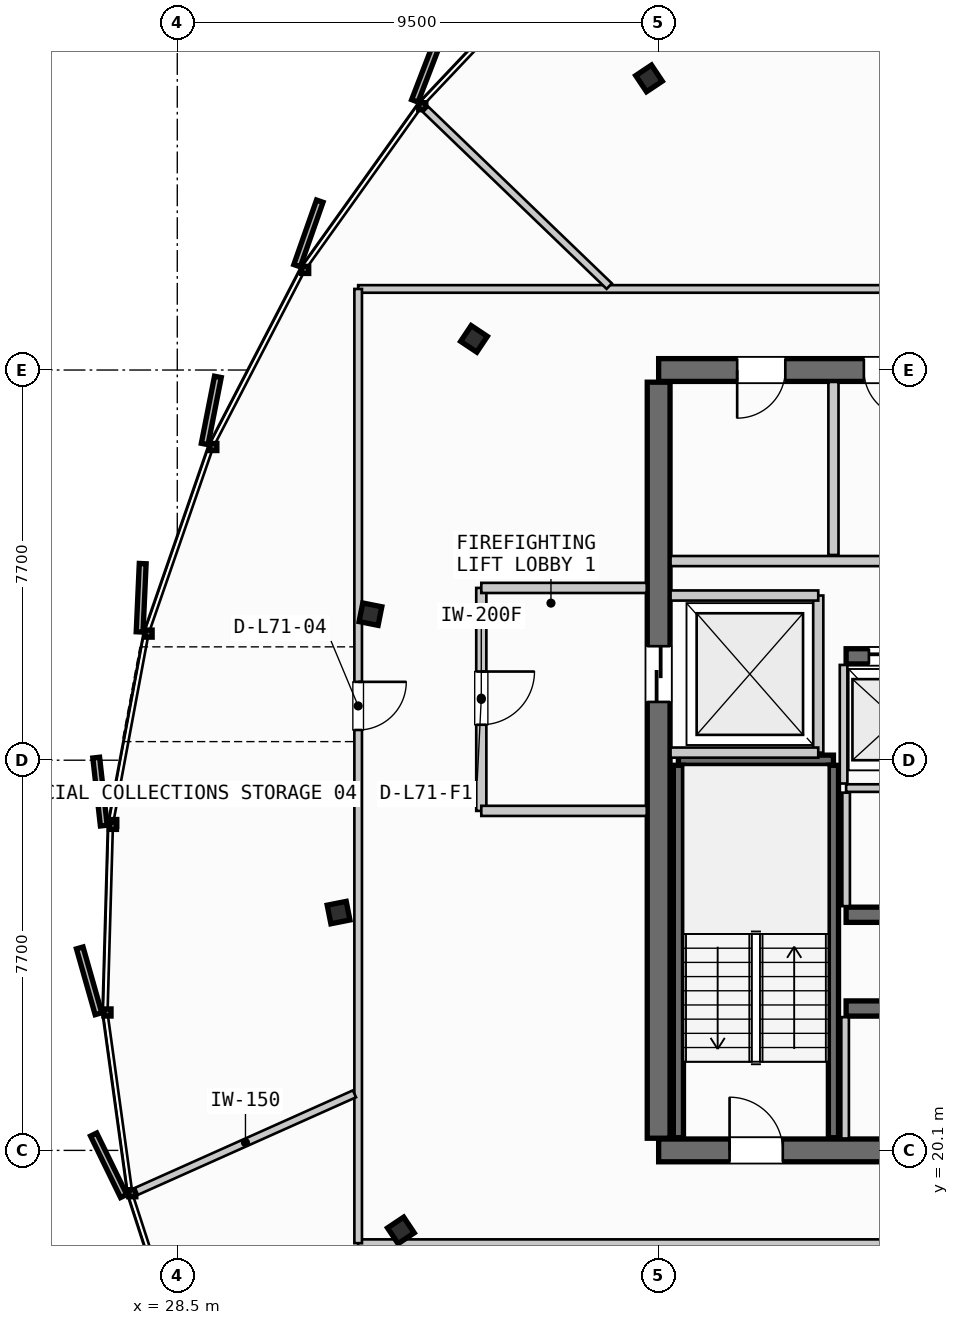
"""IFC4 building model, lengths in metres.
Left out: names, types, materials, properties, quantities, classifications, styles, units other than length and angle.
Written with IfcOpenShell. Run it as: python <this file> out.ifc"""

import sys

from ifc_helpers import new_model, si_unit, direction, frame, frame_2d, origin, origin_2d, place, context, subcontext, project, spatial, rectangle, i_section, extrude, source, transform, mapped, element, fill, save


model = new_model("IFC4")
c1 = context("Model", 3, precision=1e-05, world=origin(), true_north=direction((0.0, 1.0)))
c2 = subcontext(c1, "Body", "Model", "MODEL_VIEW")
j1 = project(units=[si_unit("LENGTHUNIT", "METRE"), si_unit("PLANEANGLEUNIT", "RADIAN")], contexts=[c1])
p1 = place(None, origin())
s1 = spatial("IfcSite", under=j1, at=p1, CompositionType="ELEMENT")
p2 = place(p1, origin())
s2 = spatial("IfcBuilding", under=s1, at=p2, CompositionType="ELEMENT")
p3 = place(p2, frame((0.0, 0.0, 269.8)))
s3 = spatial("IfcBuildingStorey", under=s2, at=p3, CompositionType="ELEMENT", Elevation=269.8)
p4 = place(p3, frame((38.0, 20.1, 0.0), z_axis=(0.0, 0.0, 1.0), x_axis=(1.0, 0.0, 0.0)))
e1 = element("IfcWall", 1, at=p4, inside=s3, PredefinedType="SHEAR", context=c2, shape_type="SweptSolid", body=[
    extrude(rectangle(XDim=17.6, YDim=0.45, at=frame_2d((8.8, 0.0))), origin(), (0.0, 0.0, 1.0), 3.21),
])
p5 = place(p4, frame((1.4, 0.0, 0.0)))
e2 = element("IfcOpeningElement", 2, at=p5, cuts=e1, PredefinedType="OPENING", context=c2, shape_type="SweptSolid", body=[
    extrude(rectangle(XDim=1.05, YDim=2.15, at=frame_2d((0.525, 1.075))), frame((0.0, 0.235, 0.0), z_axis=(0.0, -1.0, 0.0), x_axis=(1.0, 0.0, 0.0)), (0.0, 0.0, 1.0), 0.47),
])
p6 = place(p4, frame((15.15, 0.0, 0.0)))
e3 = element("IfcOpeningElement", 3, at=p6, cuts=e1, PredefinedType="OPENING", context=c2, shape_type="SweptSolid", body=[
    extrude(rectangle(XDim=1.05, YDim=2.15, at=frame_2d((0.525, 1.075))), frame((0.0, 0.235, 0.0), z_axis=(0.0, -1.0, 0.0), x_axis=(1.0, 0.0, 0.0)), (0.0, 0.0, 1.0), 0.47),
])
p7 = place(p4, frame((5.25, 0.0, 0.0)))
e4 = element("IfcOpeningElement", 4, at=p7, cuts=e1, PredefinedType="OPENING", context=c2, shape_type="SweptSolid", body=[
    extrude(rectangle(XDim=0.95, YDim=2.15, at=frame_2d((0.475, 1.075))), frame((0.0, 0.235, 0.0), z_axis=(0.0, -1.0, 0.0), x_axis=(1.0, 0.0, 0.0)), (0.0, 0.0, 1.0), 0.47),
])
p8 = place(p4, frame((11.4, 0.0, 0.0)))
e5 = element("IfcOpeningElement", 5, at=p8, cuts=e1, PredefinedType="OPENING", context=c2, shape_type="SweptSolid", body=[
    extrude(rectangle(XDim=0.95, YDim=2.15, at=frame_2d((0.475, 1.075))), frame((0.0, 0.235, 0.0), z_axis=(0.0, -1.0, 0.0), x_axis=(1.0, 0.0, 0.0)), (0.0, 0.0, 1.0), 0.47),
])
p9 = place(p3, frame((55.6, 35.5, 0.0), z_axis=(0.0, 0.0, 1.0), x_axis=(-1.0, 0.0, 0.0)))
e6 = element("IfcWall", 6, at=p9, inside=s3, PredefinedType="SHEAR", context=c2, shape_type="SweptSolid", body=[
    extrude(rectangle(XDim=17.6, YDim=0.45, at=frame_2d((8.8, 0.0))), origin(), (0.0, 0.0, 1.0), 3.21),
])
p10 = place(p9, frame((8.05, 0.0, 0.0)))
e7 = element("IfcOpeningElement", 7, at=p10, cuts=e6, PredefinedType="OPENING", context=c2, shape_type="SweptSolid", body=[
    extrude(rectangle(XDim=1.5, YDim=2.2, at=frame_2d((0.75, 1.1))), frame((0.0, 0.235, 0.0), z_axis=(0.0, -1.0, 0.0), x_axis=(1.0, 0.0, 0.0)), (0.0, 0.0, 1.0), 0.47),
])
p11 = place(p9, frame((15.1, 0.0, 0.0)))
e8 = element("IfcOpeningElement", 8, at=p11, cuts=e6, PredefinedType="OPENING", context=c2, shape_type="SweptSolid", body=[
    extrude(rectangle(XDim=0.95, YDim=2.15, at=frame_2d((0.475, 1.075))), frame((0.0, 0.235, 0.0), z_axis=(0.0, -1.0, 0.0), x_axis=(1.0, 0.0, 0.0)), (0.0, 0.0, 1.0), 0.47),
])
p12 = place(p9, frame((12.6, 0.0, 0.0)))
e9 = element("IfcOpeningElement", 9, at=p12, cuts=e6, PredefinedType="OPENING", context=c2, shape_type="SweptSolid", body=[
    extrude(rectangle(XDim=0.95, YDim=2.15, at=frame_2d((0.475, 1.075))), frame((0.0, 0.235, 0.0), z_axis=(0.0, -1.0, 0.0), x_axis=(1.0, 0.0, 0.0)), (0.0, 0.0, 1.0), 0.47),
])
p13 = place(p9, frame((10.45, 0.0, 0.0)))
e10 = element("IfcOpeningElement", 10, at=p13, cuts=e6, PredefinedType="OPENING", context=c2, shape_type="SweptSolid", body=[
    extrude(rectangle(XDim=0.95, YDim=2.15, at=frame_2d((0.475, 1.075))), frame((0.0, 0.235, 0.0), z_axis=(0.0, -1.0, 0.0), x_axis=(1.0, 0.0, 0.0)), (0.0, 0.0, 1.0), 0.47),
])
p14 = place(p3, frame((38.0, 35.26, 0.0), z_axis=(0.0, 0.0, 1.0), x_axis=(0.0, -1.0, 0.0)))
e11 = element("IfcWall", 11, at=p14, inside=s3, PredefinedType="SHEAR", context=c2, shape_type="SweptSolid", body=[
    extrude(rectangle(XDim=14.92, YDim=0.45, at=frame_2d((7.46, 0.0))), origin(), (0.0, 0.0, 1.0), 3.21),
])
p15 = place(p14, frame((5.21, 0.0, 0.0)))
e12 = element("IfcOpeningElement", 12, at=p15, cuts=e11, PredefinedType="OPENING", context=c2, shape_type="SweptSolid", body=[
    extrude(rectangle(XDim=1.1, YDim=2.2, at=frame_2d((0.55, 1.1))), frame((0.0, 0.235, 0.0), z_axis=(0.0, -1.0, 0.0), x_axis=(1.0, 0.0, 0.0)), (0.0, 0.0, 1.0), 0.47),
])
p16 = place(p3, frame((41.7, 22.9, 0.0), z_axis=(0.0, 0.0, 1.0), x_axis=(1.0, 0.0, 0.0)))
e13 = element("IfcWall", 13, at=p16, inside=s3, PredefinedType="SHEAR", context=c2, shape_type="SweptSolid", body=[
    extrude(rectangle(XDim=4.25, YDim=0.3, at=frame_2d((2.125, 0.0))), origin(), (0.0, 0.0, 1.0), 3.21),
])
p17 = place(p3, frame((41.7, 24.75, 0.0), z_axis=(0.0, 0.0, 1.0), x_axis=(1.0, 0.0, 0.0)))
e14 = element("IfcWall", 14, at=p17, inside=s3, PredefinedType="SHEAR", context=c2, shape_type="SweptSolid", body=[
    extrude(rectangle(XDim=4.25, YDim=0.3, at=frame_2d((2.125, 0.0))), origin(), (0.0, 0.0, 1.0), 3.21),
])
p18 = place(p17, frame((1.55, 0.0, 0.0)))
e15 = element("IfcOpeningElement", 15, at=p18, cuts=e14, PredefinedType="OPENING", context=c2, shape_type="SweptSolid", body=[
    extrude(rectangle(XDim=0.95, YDim=2.15, at=frame_2d((0.475, 1.075))), frame((0.0, 0.16, 0.0), z_axis=(0.0, -1.0, 0.0), x_axis=(1.0, 0.0, 0.0)), (0.0, 0.0, 1.0), 0.32),
])
p19 = place(p3, frame((41.7, 29.85, 0.0), z_axis=(0.0, 0.0, 1.0), x_axis=(1.0, 0.0, 0.0)))
e16 = element("IfcWall", 16, at=p19, inside=s3, PredefinedType="SHEAR", context=c2, shape_type="SweptSolid", body=[
    extrude(rectangle(XDim=4.25, YDim=0.3, at=frame_2d((2.125, 0.0))), origin(), (0.0, 0.0, 1.0), 3.21),
])
p20 = place(p19, frame((0.45, 0.0, 0.0)))
e17 = element("IfcOpeningElement", 17, at=p20, cuts=e16, PredefinedType="OPENING", context=c2, shape_type="SweptSolid", body=[
    extrude(rectangle(XDim=1.1, YDim=2.2, at=frame_2d((0.55, 1.1))), frame((0.0, 0.16, 0.0), z_axis=(0.0, -1.0, 0.0), x_axis=(1.0, 0.0, 0.0)), (0.0, 0.0, 1.0), 0.32),
])
p21 = place(p19, frame((2.5, 0.0, 0.0)))
e18 = element("IfcOpeningElement", 18, at=p21, cuts=e16, PredefinedType="OPENING", context=c2, shape_type="SweptSolid", body=[
    extrude(rectangle(XDim=1.1, YDim=2.2, at=frame_2d((0.55, 1.1))), frame((0.0, 0.16, 0.0), z_axis=(0.0, -1.0, 0.0), x_axis=(1.0, 0.0, 0.0)), (0.0, 0.0, 1.0), 0.32),
])
m1 = source(origin(), c2, "Body", "SweptSolid", [
    extrude(i_section(OverallWidth=0.374, OverallDepth=0.383, WebThickness=0.017, FlangeThickness=0.026, FilletRadius=0.015, at=origin_2d()), origin(), (0.0, 0.0, 1.0), 3.21),
])
for number, where, z_axis, x_axis in (
    (19, (37.81, 41.255, 0.0), (0.0, 0.0, 1.0), (-0.556, 0.831, 0.0)),
    (20, (34.356, 36.115, 0.0), (0.0, 0.0, 1.0), (-0.831, 0.556, 0.0)),
    (21, (32.312, 30.682, 0.0), (0.0, 0.0, 1.0), (-0.981, 0.195, 0.0)),
    (22, (31.683, 24.793, 0.0), (0.0, 0.0, 1.0), (-0.981, -0.195, 0.0)),
    (23, (32.913, 18.521, 0.0), (0.0, 0.0, 1.0), (-0.831, -0.556, 0.0)),
):
    element("IfcColumn", number, at=place(p3, frame(where, z_axis=z_axis, x_axis=x_axis)), inside=s3, PredefinedType="COLUMN", context=c2, shape_type="MappedRepresentation", body=[
        mapped(m1, transform((0.0, 0.0, 0.0), scale=1.0)),
    ])
p22 = place(p3, frame((38.39, 27.8, 0.0), z_axis=(0.0, 0.0, 1.0), x_axis=(1.0, 0.0, 0.0)))
e24 = element("IfcWall", 24, at=p22, inside=s3, PredefinedType="SHEAR", context=c2, shape_type="SweptSolid", body=[
    extrude(rectangle(XDim=3.06, YDim=0.2, at=frame_2d((1.53, 0.0))), origin(), (0.0, 0.0, 1.0), 3.21),
])
for number, where, z_axis, x_axis in (
    (25, (41.45, 27.7, 0.0), (0.0, 0.0, 1.0), (0.0, -1.0, 0.0)),
    (26, (38.39, 20.35, 0.0), (0.0, 0.0, 1.0), (0.0, 1.0, 0.0)),
):
    element("IfcWall", number, at=place(p3, frame(where, z_axis=z_axis, x_axis=x_axis)), inside=s3, PredefinedType="SHEAR", context=c2, shape_type="SweptSolid", body=[
        extrude(rectangle(XDim=7.35, YDim=0.2, at=frame_2d((3.675, 0.0))), origin(), (0.0, 0.0, 1.0), 3.21),
    ])
p23 = place(p3, frame((41.15, 27.95, 0.0), z_axis=(0.0, 0.0, 1.0), x_axis=(0.0, 1.0, 0.0)))
e27 = element("IfcWall", 27, at=p23, inside=s3, PredefinedType="PARTITIONING", context=c2, shape_type="SweptSolid", body=[
    extrude(rectangle(XDim=3.1, YDim=0.2, at=frame_2d((1.55, 0.0))), origin(), (0.0, 0.0, 1.0), 2.595),
])
for number, where, z_axis, x_axis in (
    (28, (38.235, 27.95, 0.0), (0.0, 0.0, 1.0), (1.0, 0.0, 0.0)),
    (29, (38.235, 31.05, 0.0), (0.0, 0.0, 1.0), (1.0, 0.0, 0.0)),
):
    element("IfcWall", number, at=place(p3, frame(where, z_axis=z_axis, x_axis=x_axis)), inside=s3, PredefinedType="PARTITIONING", context=c2, shape_type="SweptSolid", body=[
        extrude(rectangle(XDim=2.915, YDim=0.2, at=frame_2d((1.458, 0.0))), origin(), (0.0, 0.0, 1.0), 2.595),
    ])
p24 = place(p3, frame((34.5, 31.2, 0.0), z_axis=(0.0, 0.0, 1.0), x_axis=(0.0, -1.0, 0.0)))
e30 = element("IfcWall", 30, at=p24, inside=s3, PredefinedType="PARTITIONING", context=c2, shape_type="SweptSolid", body=[
    extrude(rectangle(XDim=4.4, YDim=0.2, at=frame_2d((2.2, 0.0))), origin(), (0.0, 0.0, 1.0), 2.595),
])
p25 = place(p24, frame((1.65, 0.0, 0.0)))
e31 = element("IfcOpeningElement", 31, at=p25, cuts=e30, PredefinedType="OPENING", context=c2, shape_type="SweptSolid", body=[
    extrude(rectangle(XDim=1.05, YDim=2.15, at=frame_2d((0.525, 1.075))), frame((0.0, 0.11, 0.0), z_axis=(0.0, -1.0, 0.0), x_axis=(1.0, 0.0, 0.0)), (0.0, 0.0, 1.0), 0.22),
])
for number, where, z_axis, x_axis in (
    (32, (34.5, 26.8, 0.0), (0.0, 0.0, 1.0), (1.0, 0.0, 0.0)),
    (33, (34.5, 31.2, 0.0), (0.0, 0.0, 1.0), (1.0, 0.0, 0.0)),
):
    element("IfcWall", number, at=place(p3, frame(where, z_axis=z_axis, x_axis=x_axis)), inside=s3, PredefinedType="PARTITIONING", context=c2, shape_type="SweptSolid", body=[
        extrude(rectangle(XDim=3.265, YDim=0.2, at=frame_2d((1.632, 0.0))), origin(), (0.0, 0.0, 1.0), 2.595),
    ])
p26 = place(p3, frame((41.68, 20.335, 0.0), z_axis=(0.0, 0.0, 1.0), x_axis=(0.0, 1.0, 0.0)))
e34 = element("IfcWall", 34, at=p26, inside=s3, PredefinedType="PARTITIONING", context=c2, shape_type="SweptSolid", body=[
    extrude(rectangle(XDim=2.395, YDim=0.15, at=frame_2d((1.198, 0.0))), origin(), (0.0, 0.0, 1.0), 2.595),
])
p27 = place(p3, frame((41.7, 27.25, 0.0), z_axis=(0.0, 0.0, 1.0), x_axis=(1.0, 0.0, 0.0)))
e35 = element("IfcWall", 35, at=p27, inside=s3, PredefinedType="PARTITIONING", context=c2, shape_type="SweptSolid", body=[
    extrude(rectangle(XDim=4.25, YDim=0.15, at=frame_2d((2.125, 0.0))), origin(), (0.0, 0.0, 1.0), 2.595),
])
p28 = place(p3, frame((41.7, 24.92, 0.0), z_axis=(0.0, 0.0, 1.0), x_axis=(0.0, 1.0, 0.0)))
e36 = element("IfcWall", 36, at=p28, inside=s3, PredefinedType="PARTITIONING", context=c2, shape_type="SweptSolid", body=[
    extrude(rectangle(XDim=2.24, YDim=0.15, at=frame_2d((1.12, 0.0))), origin(), (0.0, 0.0, 1.0), 2.595),
])
p29 = place(p3, frame((41.65, 27.34, 0.0), z_axis=(0.0, 0.0, 1.0), x_axis=(0.0, 1.0, 0.0)))
e37 = element("IfcWall", 37, at=p29, inside=s3, PredefinedType="PARTITIONING", context=c2, shape_type="SweptSolid", body=[
    extrude(rectangle(XDim=2.34, YDim=0.15, at=frame_2d((1.17, 0.0))), origin(), (0.0, 0.0, 1.0), 2.595),
])
p30 = place(p3, frame((41.45, 31.85, 0.0), z_axis=(0.0, 0.0, 1.0), x_axis=(0.0, 1.0, 0.0)))
e38 = element("IfcWall", 38, at=p30, inside=s3, PredefinedType="PARTITIONING", context=c2, shape_type="SweptSolid", body=[
    extrude(rectangle(XDim=3.415, YDim=0.2, at=frame_2d((1.708, 0.0))), origin(), (0.0, 0.0, 1.0), 2.595),
])
p31 = place(p3, frame((38.235, 31.73, 0.0), z_axis=(0.0, 0.0, 1.0), x_axis=(1.0, 0.0, 0.0)))
e39 = element("IfcWall", 39, at=p31, inside=s3, PredefinedType="PARTITIONING", context=c2, shape_type="SweptSolid", body=[
    extrude(rectangle(XDim=7.565, YDim=0.2, at=frame_2d((3.782, 0.0))), origin(), (0.0, 0.0, 1.0), 2.595),
])
p32 = place(p3, frame((32.07, 18.269, 0.0), z_axis=(0.0, 0.0, 1.0), x_axis=(1.0, 0.0, 0.0)))
e40 = element("IfcWall", 40, at=p32, inside=s3, PredefinedType="PARTITIONING", context=c2, shape_type="SweptSolid", body=[
    extrude(rectangle(XDim=29.156, YDim=0.15, at=frame_2d((14.578, 0.0))), origin(), (0.0, 0.0, 1.0), 2.595),
])
p33 = place(p32, frame((12.24, 0.0, 0.0)))
e41 = element("IfcOpeningElement", 41, at=p33, cuts=e40, PredefinedType="OPENING", context=c2, shape_type="SweptSolid", body=[
    extrude(rectangle(XDim=0.95, YDim=2.15, at=frame_2d((0.475, 1.075))), frame((0.0, 0.085, 0.0), z_axis=(0.0, -1.0, 0.0), x_axis=(1.0, 0.0, 0.0)), (0.0, 0.0, 1.0), 0.17),
])
p34 = place(p3, frame((61.226, 37.1, 0.0), z_axis=(0.0, 0.0, 1.0), x_axis=(-1.0, 0.0, 0.0)))
e42 = element("IfcWall", 42, at=p34, inside=s3, PredefinedType="PARTITIONING", context=c2, shape_type="SweptSolid", body=[
    extrude(rectangle(XDim=29.156, YDim=0.15, at=frame_2d((14.578, 0.0))), origin(), (0.0, 0.0, 1.0), 2.595),
])
p35 = place(p34, frame((11.949, 0.0, 0.0)))
e43 = element("IfcOpeningElement", 43, at=p35, cuts=e42, PredefinedType="OPENING", context=c2, shape_type="SweptSolid", body=[
    extrude(rectangle(XDim=0.95, YDim=2.15, at=frame_2d((0.475, 1.075))), frame((0.0, 0.085, 0.0), z_axis=(0.0, -1.0, 0.0), x_axis=(1.0, 0.0, 0.0)), (0.0, 0.0, 1.0), 0.17),
])
p36 = place(p3, frame((32.07, 37.1, 0.0), z_axis=(0.0, 0.0, 1.0), x_axis=(0.0, -1.0, 0.0)))
e44 = element("IfcWall", 44, at=p36, inside=s3, PredefinedType="PARTITIONING", context=c2, shape_type="SweptSolid", body=[
    extrude(rectangle(XDim=18.831, YDim=0.15, at=frame_2d((9.416, 0.0))), origin(), (0.0, 0.0, 1.0), 2.595),
])
p37 = place(p36, frame((7.754, 0.0, 0.0)))
e45 = element("IfcOpeningElement", 45, at=p37, cuts=e44, PredefinedType="OPENING", context=c2, shape_type="SweptSolid", body=[
    extrude(rectangle(XDim=0.95, YDim=2.15, at=frame_2d((0.475, 1.075))), frame((0.0, 0.085, 0.0), z_axis=(0.0, -1.0, 0.0), x_axis=(1.0, 0.0, 0.0)), (0.0, 0.0, 1.0), 0.17),
])
p38 = place(p3, frame((31.997, 21.216, 0.0), z_axis=(0.0, 0.0, 1.0), x_axis=(-0.912837051259, -0.408324035356, 0.0)))
e46 = element("IfcWall", 46, at=p38, inside=s3, PredefinedType="PARTITIONING", context=c2, shape_type="SweptSolid", body=[
    extrude(rectangle(XDim=4.713, YDim=0.15, at=frame_2d((2.357, 0.0))), origin(), (0.0, 0.0, 1.0), 2.595),
])
p39 = place(p3, frame((37.025, 37.156, 0.0), z_axis=(0.0, 0.0, 1.0), x_axis=(-0.720562610488, 0.693389879049, 0.0)))
e47 = element("IfcWall", 47, at=p39, inside=s3, PredefinedType="PARTITIONING", context=c2, shape_type="SweptSolid", body=[
    extrude(rectangle(XDim=5.031, YDim=0.15, at=frame_2d((2.516, 0.0))), origin(), (0.0, 0.0, 1.0), 2.595),
])
m2 = source(origin(), c2, "Body", "SweptSolid", [
    extrude(rectangle(XDim=1.05, YDim=2.15, at=frame_2d((0.525, 1.075))), frame((0.0, 0.025, 0.0), z_axis=(0.0, -1.0, 0.0), x_axis=(1.0, 0.0, 0.0)), (0.0, 0.0, 1.0), 0.05),
])
p40 = place(p5, origin())
e48 = element("IfcDoor", 48, at=p40, inside=s3, OperationType="SINGLE_SWING_LEFT", PredefinedType="DOOR", context=c2, shape_type="MappedRepresentation", body=[
    mapped(m2, transform((0.0, 0.0, 0.0), scale=1.0)),
])
fill(e2, e48)
m3 = source(origin(), c2, "Body", "SweptSolid", [
    extrude(rectangle(XDim=1.1, YDim=2.2, at=frame_2d((0.55, 1.1))), frame((0.0, 0.025, 0.0), z_axis=(0.0, -1.0, 0.0), x_axis=(1.0, 0.0, 0.0)), (0.0, 0.0, 1.0), 0.05),
])
p41 = place(p15, origin())
e49 = element("IfcDoor", 49, at=p41, inside=s3, OperationType="SLIDING_TO_LEFT", PredefinedType="DOOR", context=c2, shape_type="MappedRepresentation", body=[
    mapped(m3, transform((0.0, 0.0, 0.0), scale=1.0)),
])
fill(e12, e49)
p42 = place(p20, origin())
e50 = element("IfcDoor", 50, at=p42, inside=s3, OperationType="SLIDING_TO_LEFT", PredefinedType="DOOR", context=c2, shape_type="MappedRepresentation", body=[
    mapped(m3, transform((0.0, 0.0, 0.0), scale=1.0)),
])
fill(e17, e50)
m4 = source(origin(), c2, "Body", "SweptSolid", [
    extrude(rectangle(XDim=0.95, YDim=2.15, at=frame_2d((0.475, 1.075))), frame((0.0, 0.025, 0.0), z_axis=(0.0, -1.0, 0.0), x_axis=(1.0, 0.0, 0.0)), (0.0, 0.0, 1.0), 0.05),
])
p43 = place(p11, origin())
e51 = element("IfcDoor", 51, at=p43, inside=s3, OperationType="SINGLE_SWING_RIGHT", PredefinedType="DOOR", context=c2, shape_type="MappedRepresentation", body=[
    mapped(m4, transform((0.0, 0.0, 0.0), scale=1.0)),
])
fill(e8, e51)
p44 = place(p12, origin())
e52 = element("IfcDoor", 52, at=p44, inside=s3, OperationType="SINGLE_SWING_LEFT", PredefinedType="DOOR", context=c2, shape_type="MappedRepresentation", body=[
    mapped(m4, transform((0.0, 0.0, 0.0), scale=1.0)),
])
fill(e9, e52)
p45 = place(p25, origin())
e53 = element("IfcDoor", 53, at=p45, inside=s3, OperationType="SINGLE_SWING_LEFT", PredefinedType="DOOR", context=c2, shape_type="MappedRepresentation", body=[
    mapped(m2, transform((0.0, 0.0, 0.0), scale=1.0)),
])
fill(e31, e53)
p46 = place(p37, origin())
e54 = element("IfcDoor", 54, at=p46, inside=s3, OperationType="SINGLE_SWING_LEFT", PredefinedType="DOOR", context=c2, shape_type="MappedRepresentation", body=[
    mapped(m4, transform((0.0, 0.0, 0.0), scale=1.0)),
])
fill(e45, e54)
save(model, sys.argv[1])
